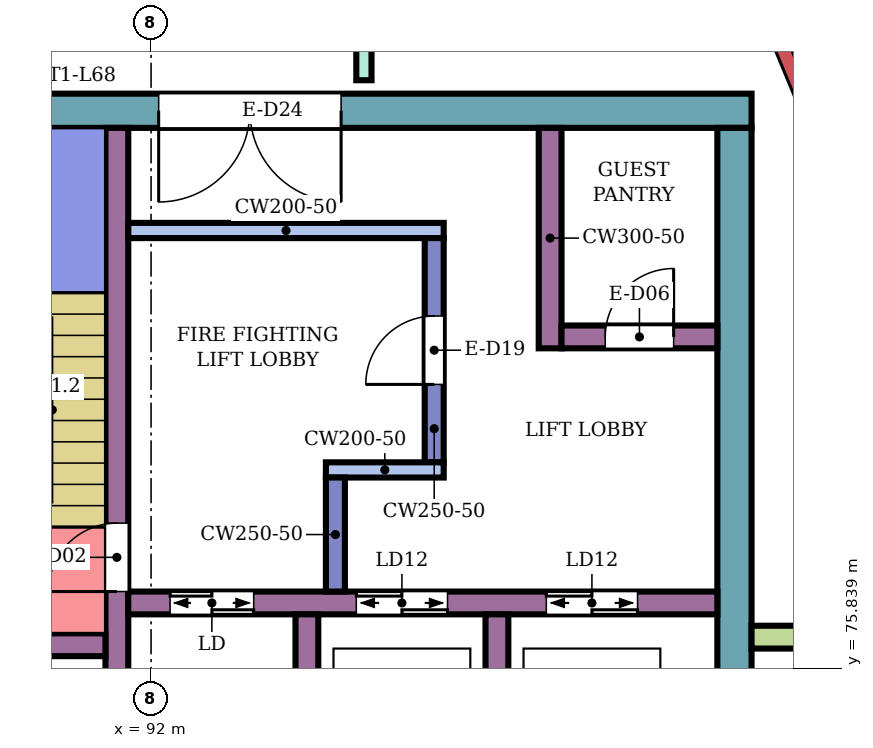
"""IFC4 building model, lengths in metres.
Left out: names, types, materials, properties, quantities, classifications, styles, units other than length and angle.
Written with IfcOpenShell. Run it as: python <this file> out.ifc"""

import sys

from ifc_helpers import new_model, si_unit, direction, frame, frame_2d, origin, place, context, subcontext, project, spatial, rectangle, extrude, element, fill, save


model = new_model("IFC4")
c1 = context("Model", 3, precision=1e-05, world=origin(), true_north=direction((0.0, 1.0)))
c2 = subcontext(c1, "Body", "Model", "MODEL_VIEW")
j1 = project(units=[si_unit("LENGTHUNIT", "METRE"), si_unit("PLANEANGLEUNIT", "RADIAN")], contexts=[c1])
p1 = place(None, origin())
s1 = spatial("IfcSite", under=j1, at=p1, CompositionType="ELEMENT")
p2 = place(p1, origin())
s2 = spatial("IfcBuilding", under=s1, at=p2, CompositionType="ELEMENT")
p3 = place(p2, frame((0.0, 0.0, 296.7)))
s3 = spatial("IfcBuildingStorey", under=s2, at=p3, CompositionType="ELEMENT", Elevation=296.7)
p4 = place(p3, frame((87.9, 83.175, 0.0), z_axis=(0.0, 0.0, 1.0), x_axis=(1.0, 0.0, 0.0)))
e1 = element("IfcWall", 1, at=p4, inside=s3, PredefinedType="SHEAR", context=c2, shape_type="SweptSolid", body=[
    extrude(rectangle(XDim=12.0, YDim=0.45, at=frame_2d((6.0, 0.0))), origin(), (0.0, 0.0, 1.0), 3.88),
])
p5 = place(p4, frame((4.2, 0.0, 0.0)))
e2 = element("IfcOpeningElement", 2, at=p5, cuts=e1, PredefinedType="OPENING", context=c2, shape_type="SweptSolid", body=[
    extrude(rectangle(XDim=2.4, YDim=2.4, at=frame_2d((1.2, 1.2))), frame((0.0, 0.235, 0.0), z_axis=(0.0, -1.0, 0.0), x_axis=(1.0, 0.0, 0.0)), (0.0, 0.0, 1.0), 0.47),
])
p6 = place(p3, frame((99.675, 73.6, 0.0), z_axis=(0.0, 0.0, 1.0), x_axis=(0.0, 1.0, 0.0)))
e3 = element("IfcWall", 3, at=p6, inside=s3, PredefinedType="SHEAR", context=c2, shape_type="SweptSolid", body=[
    extrude(rectangle(XDim=9.35, YDim=0.45, at=frame_2d((4.675, 0.0))), origin(), (0.0, 0.0, 1.0), 3.88),
])
p7 = place(p3, frame((91.55, 75.0, 0.0), z_axis=(0.0, 0.0, 1.0), x_axis=(0.0, 1.0, 0.0)))
e4 = element("IfcWall", 4, at=p7, inside=s3, PredefinedType="SHEAR", context=c2, shape_type="SweptSolid", body=[
    extrude(rectangle(XDim=7.95, YDim=0.3, at=frame_2d((3.975, 0.0))), origin(), (0.0, 0.0, 1.0), 3.88),
])
p8 = place(p7, frame((1.85, 0.0, 0.0)))
e5 = element("IfcOpeningElement", 5, at=p8, cuts=e4, PredefinedType="OPENING", context=c2, shape_type="SweptSolid", body=[
    extrude(rectangle(XDim=0.9, YDim=2.1, at=frame_2d((0.45, 1.05))), frame((0.0, 0.16, 0.0), z_axis=(0.0, -1.0, 0.0), x_axis=(1.0, 0.0, 0.0)), (0.0, 0.0, 1.0), 0.32),
])
p9 = place(p3, frame((88.35, 76.15, 0.0), z_axis=(0.0, 0.0, 1.0), x_axis=(1.0, 0.0, 0.0)))
e6 = element("IfcWall", 6, at=p9, inside=s3, PredefinedType="SHEAR", context=c2, shape_type="SweptSolid", body=[
    extrude(rectangle(XDim=3.05, YDim=0.3, at=frame_2d((1.525, 0.0))), origin(), (0.0, 0.0, 1.0), 3.88),
])
p10 = place(p9, frame((1.1, 0.0, 0.0)))
e7 = element("IfcOpeningElement", 7, at=p10, cuts=e6, PredefinedType="OPENING", context=c2, shape_type="SweptSolid", body=[
    extrude(rectangle(XDim=0.7, YDim=2.0, at=frame_2d((0.35, 1.0))), frame((0.0, 0.16, 0.0), z_axis=(0.0, -1.0, 0.0), x_axis=(1.0, 0.0, 0.0)), (0.0, 0.0, 1.0), 0.32),
])
p11 = place(p3, frame((91.7, 76.7, 0.0), z_axis=(0.0, 0.0, 1.0), x_axis=(1.0, 0.0, 0.0)))
e8 = element("IfcWall", 8, at=p11, inside=s3, PredefinedType="SHEAR", context=c2, shape_type="SweptSolid", body=[
    extrude(rectangle(XDim=7.75, YDim=0.3, at=frame_2d((3.875, 0.0))), origin(), (0.0, 0.0, 1.0), 3.88),
])
p12 = place(p11, frame((0.55, 0.0, 0.0)))
e9 = element("IfcOpeningElement", 9, at=p12, cuts=e8, PredefinedType="OPENING", context=c2, shape_type="SweptSolid", body=[
    extrude(rectangle(XDim=1.1, YDim=2.1, at=frame_2d((0.55, 1.05))), frame((0.0, 0.16, 0.0), z_axis=(0.0, -1.0, 0.0), x_axis=(1.0, 0.0, 0.0)), (0.0, 0.0, 1.0), 0.32),
])
p13 = place(p11, frame((3.0, 0.0, 0.0)))
e10 = element("IfcOpeningElement", 10, at=p13, cuts=e8, PredefinedType="OPENING", context=c2, shape_type="SweptSolid", body=[
    extrude(rectangle(XDim=1.2, YDim=2.1, at=frame_2d((0.6, 1.05))), frame((0.0, 0.16, 0.0), z_axis=(0.0, -1.0, 0.0), x_axis=(1.0, 0.0, 0.0)), (0.0, 0.0, 1.0), 0.32),
])
p14 = place(p11, frame((5.5, 0.0, 0.0)))
e11 = element("IfcOpeningElement", 11, at=p14, cuts=e8, PredefinedType="OPENING", context=c2, shape_type="SweptSolid", body=[
    extrude(rectangle(XDim=1.2, YDim=2.1, at=frame_2d((0.6, 1.05))), frame((0.0, 0.16, 0.0), z_axis=(0.0, -1.0, 0.0), x_axis=(1.0, 0.0, 0.0)), (0.0, 0.0, 1.0), 0.32),
])
for number, where, z_axis, x_axis in (
    (12, (94.05, 74.0, 0.0), (0.0, 0.0, 1.0), (0.0, 1.0, 0.0)),
    (13, (96.55, 74.0, 0.0), (0.0, 0.0, 1.0), (0.0, 1.0, 0.0)),
):
    element("IfcWall", number, at=place(p3, frame(where, z_axis=z_axis, x_axis=x_axis)), inside=s3, PredefinedType="SHEAR", context=c2, shape_type="SweptSolid", body=[
        extrude(rectangle(XDim=2.55, YDim=0.3, at=frame_2d((1.275, 0.0))), origin(), (0.0, 0.0, 1.0), 3.88),
    ])
p15 = place(p3, frame((91.7, 81.6, 0.0), z_axis=(0.0, 0.0, 1.0), x_axis=(1.0, 0.0, 0.0)))
e14 = element("IfcWall", 14, at=p15, inside=s3, PredefinedType="SHEAR", context=c2, shape_type="SweptSolid", body=[
    extrude(rectangle(XDim=4.15, YDim=0.2, at=frame_2d((2.075, 0.0))), origin(), (0.0, 0.0, 1.0), 3.88),
])
p16 = place(p3, frame((95.725, 78.55, 0.0), z_axis=(0.0, 0.0, 1.0), x_axis=(0.0, 1.0, 0.0)))
e15 = element("IfcWall", 15, at=p16, inside=s3, PredefinedType="SHEAR", context=c2, shape_type="SweptSolid", body=[
    extrude(rectangle(XDim=2.95, YDim=0.25, at=frame_2d((1.475, 0.0))), origin(), (0.0, 0.0, 1.0), 3.88),
])
p17 = place(p16, frame((1.025, 0.0, 0.0)))
e16 = element("IfcOpeningElement", 16, at=p17, cuts=e15, PredefinedType="OPENING", context=c2, shape_type="SweptSolid", body=[
    extrude(rectangle(XDim=0.9, YDim=2.1, at=frame_2d((0.45, 1.05))), frame((0.0, 0.135, 0.0), z_axis=(0.0, -1.0, 0.0), x_axis=(1.0, 0.0, 0.0)), (0.0, 0.0, 1.0), 0.27),
])
p18 = place(p3, frame((94.3, 78.45, 0.0), z_axis=(0.0, 0.0, 1.0), x_axis=(1.0, 0.0, 0.0)))
e17 = element("IfcWall", 17, at=p18, inside=s3, PredefinedType="SHEAR", context=c2, shape_type="SweptSolid", body=[
    extrude(rectangle(XDim=1.55, YDim=0.2, at=frame_2d((0.775, 0.0))), origin(), (0.0, 0.0, 1.0), 3.88),
])
p19 = place(p3, frame((94.425, 76.85, 0.0), z_axis=(0.0, 0.0, 1.0), x_axis=(0.0, 1.0, 0.0)))
e18 = element("IfcWall", 18, at=p19, inside=s3, PredefinedType="SHEAR", context=c2, shape_type="SweptSolid", body=[
    extrude(rectangle(XDim=1.5, YDim=0.25, at=frame_2d((0.75, 0.0))), origin(), (0.0, 0.0, 1.0), 3.88),
])
p20 = place(p3, frame((97.25, 80.05, 0.0), z_axis=(0.0, 0.0, 1.0), x_axis=(0.0, 1.0, 0.0)))
e19 = element("IfcWall", 19, at=p20, inside=s3, PredefinedType="SHEAR", context=c2, shape_type="SweptSolid", body=[
    extrude(rectangle(XDim=2.9, YDim=0.3, at=frame_2d((1.45, 0.0))), origin(), (0.0, 0.0, 1.0), 3.88),
])
p21 = place(p3, frame((97.4, 80.2, 0.0), z_axis=(0.0, 0.0, 1.0), x_axis=(1.0, 0.0, 0.0)))
e20 = element("IfcWall", 20, at=p21, inside=s3, PredefinedType="SHEAR", context=c2, shape_type="SweptSolid", body=[
    extrude(rectangle(XDim=2.05, YDim=0.3, at=frame_2d((1.025, 0.0))), origin(), (0.0, 0.0, 1.0), 3.88),
])
p22 = place(p21, frame((0.575, 0.0, 0.0)))
e21 = element("IfcOpeningElement", 21, at=p22, cuts=e20, PredefinedType="OPENING", context=c2, shape_type="SweptSolid", body=[
    extrude(rectangle(XDim=0.9, YDim=2.1, at=frame_2d((0.45, 1.05))), frame((0.0, 0.16, 0.0), z_axis=(0.0, -1.0, 0.0), x_axis=(1.0, 0.0, 0.0)), (0.0, 0.0, 1.0), 0.32),
])
p23 = place(p3, frame((99.9, 76.25, 0.0), z_axis=(0.0, 0.0, 1.0), x_axis=(1.0, 0.0, 0.0)))
e22 = element("IfcWall", 22, at=p23, inside=s3, PredefinedType="NOTDEFINED", context=c2, shape_type="SweptSolid", body=[
    extrude(rectangle(XDim=2.416, YDim=0.3, at=frame_2d((1.208, 0.0))), origin(), (0.0, 0.0, 1.0), 4.2),
])
p24 = place(p3, frame((94.8, 83.577, 0.0), z_axis=(0.0, 0.0, 1.0), x_axis=(0.0, 1.0, 0.0)))
e23 = element("IfcWall", 23, at=p24, inside=s3, PredefinedType="PARTITIONING", context=c2, shape_type="SweptSolid", body=[
    extrude(rectangle(XDim=1.323, YDim=0.2, at=frame_2d((0.662, 0.0))), origin(), (0.0, 0.0, 1.0), 3.75),
])
p25 = place(p8, origin())
e24 = element("IfcDoor", 24, at=p25, inside=s3, OperationType="SINGLE_SWING_LEFT", PredefinedType="DOOR", context=c2, shape_type="SweptSolid", body=[
    extrude(rectangle(XDim=0.9, YDim=2.1, at=frame_2d((0.45, 1.05))), frame((0.0, 0.025, 0.0), z_axis=(0.0, -1.0, 0.0), x_axis=(1.0, 0.0, 0.0)), (0.0, 0.0, 1.0), 0.05),
])
fill(e5, e24)
p26 = place(p12, origin())
e25 = element("IfcDoor", 25, at=p26, inside=s3, OperationType="DOUBLE_DOOR_SLIDING", PredefinedType="DOOR", context=c2, shape_type="SweptSolid", body=[
    extrude(rectangle(XDim=1.1, YDim=2.1, at=frame_2d((0.55, 1.05))), frame((0.0, 0.025, 0.0), z_axis=(0.0, -1.0, 0.0), x_axis=(1.0, 0.0, 0.0)), (0.0, 0.0, 1.0), 0.05),
])
fill(e9, e25)
p27 = place(p13, origin())
e26 = element("IfcDoor", 26, at=p27, inside=s3, OperationType="DOUBLE_DOOR_SLIDING", PredefinedType="DOOR", context=c2, shape_type="SweptSolid", body=[
    extrude(rectangle(XDim=1.2, YDim=2.1, at=frame_2d((0.6, 1.05))), frame((0.0, 0.025, 0.0), z_axis=(0.0, -1.0, 0.0), x_axis=(1.0, 0.0, 0.0)), (0.0, 0.0, 1.0), 0.05),
])
fill(e10, e26)
p28 = place(p14, origin())
e27 = element("IfcDoor", 27, at=p28, inside=s3, OperationType="DOUBLE_DOOR_SLIDING", PredefinedType="DOOR", context=c2, shape_type="SweptSolid", body=[
    extrude(rectangle(XDim=1.2, YDim=2.1, at=frame_2d((0.6, 1.05))), frame((0.0, 0.025, 0.0), z_axis=(0.0, -1.0, 0.0), x_axis=(1.0, 0.0, 0.0)), (0.0, 0.0, 1.0), 0.05),
])
fill(e11, e27)
p29 = place(p17, origin())
e28 = element("IfcDoor", 28, at=p29, inside=s3, OperationType="SINGLE_SWING_LEFT", PredefinedType="DOOR", context=c2, shape_type="SweptSolid", body=[
    extrude(rectangle(XDim=0.9, YDim=2.1, at=frame_2d((0.45, 1.05))), frame((0.0, 0.025, 0.0), z_axis=(0.0, -1.0, 0.0), x_axis=(1.0, 0.0, 0.0)), (0.0, 0.0, 1.0), 0.05),
])
fill(e16, e28)
p30 = place(p22, origin())
e29 = element("IfcDoor", 29, at=p30, inside=s3, OperationType="SINGLE_SWING_RIGHT", PredefinedType="DOOR", context=c2, shape_type="SweptSolid", body=[
    extrude(rectangle(XDim=0.9, YDim=2.1, at=frame_2d((0.45, 1.05))), frame((0.0, 0.025, 0.0), z_axis=(0.0, -1.0, 0.0), x_axis=(1.0, 0.0, 0.0)), (0.0, 0.0, 1.0), 0.05),
])
fill(e21, e29)
p31 = place(p5, frame((2.4, 0.0, 0.0), z_axis=(0.0, 0.0, 1.0), x_axis=(-1.0, 0.0, 0.0)))
e30 = element("IfcDoor", 30, at=p31, inside=s3, OperationType="DOUBLE_DOOR_SINGLE_SWING", PredefinedType="DOOR", context=c2, shape_type="SweptSolid", body=[
    extrude(rectangle(XDim=2.4, YDim=2.4, at=frame_2d((1.2, 1.2))), frame((0.0, 0.025, 0.0), z_axis=(0.0, -1.0, 0.0), x_axis=(1.0, 0.0, 0.0)), (0.0, 0.0, 1.0), 0.05),
])
fill(e2, e30)
save(model, sys.argv[1])
